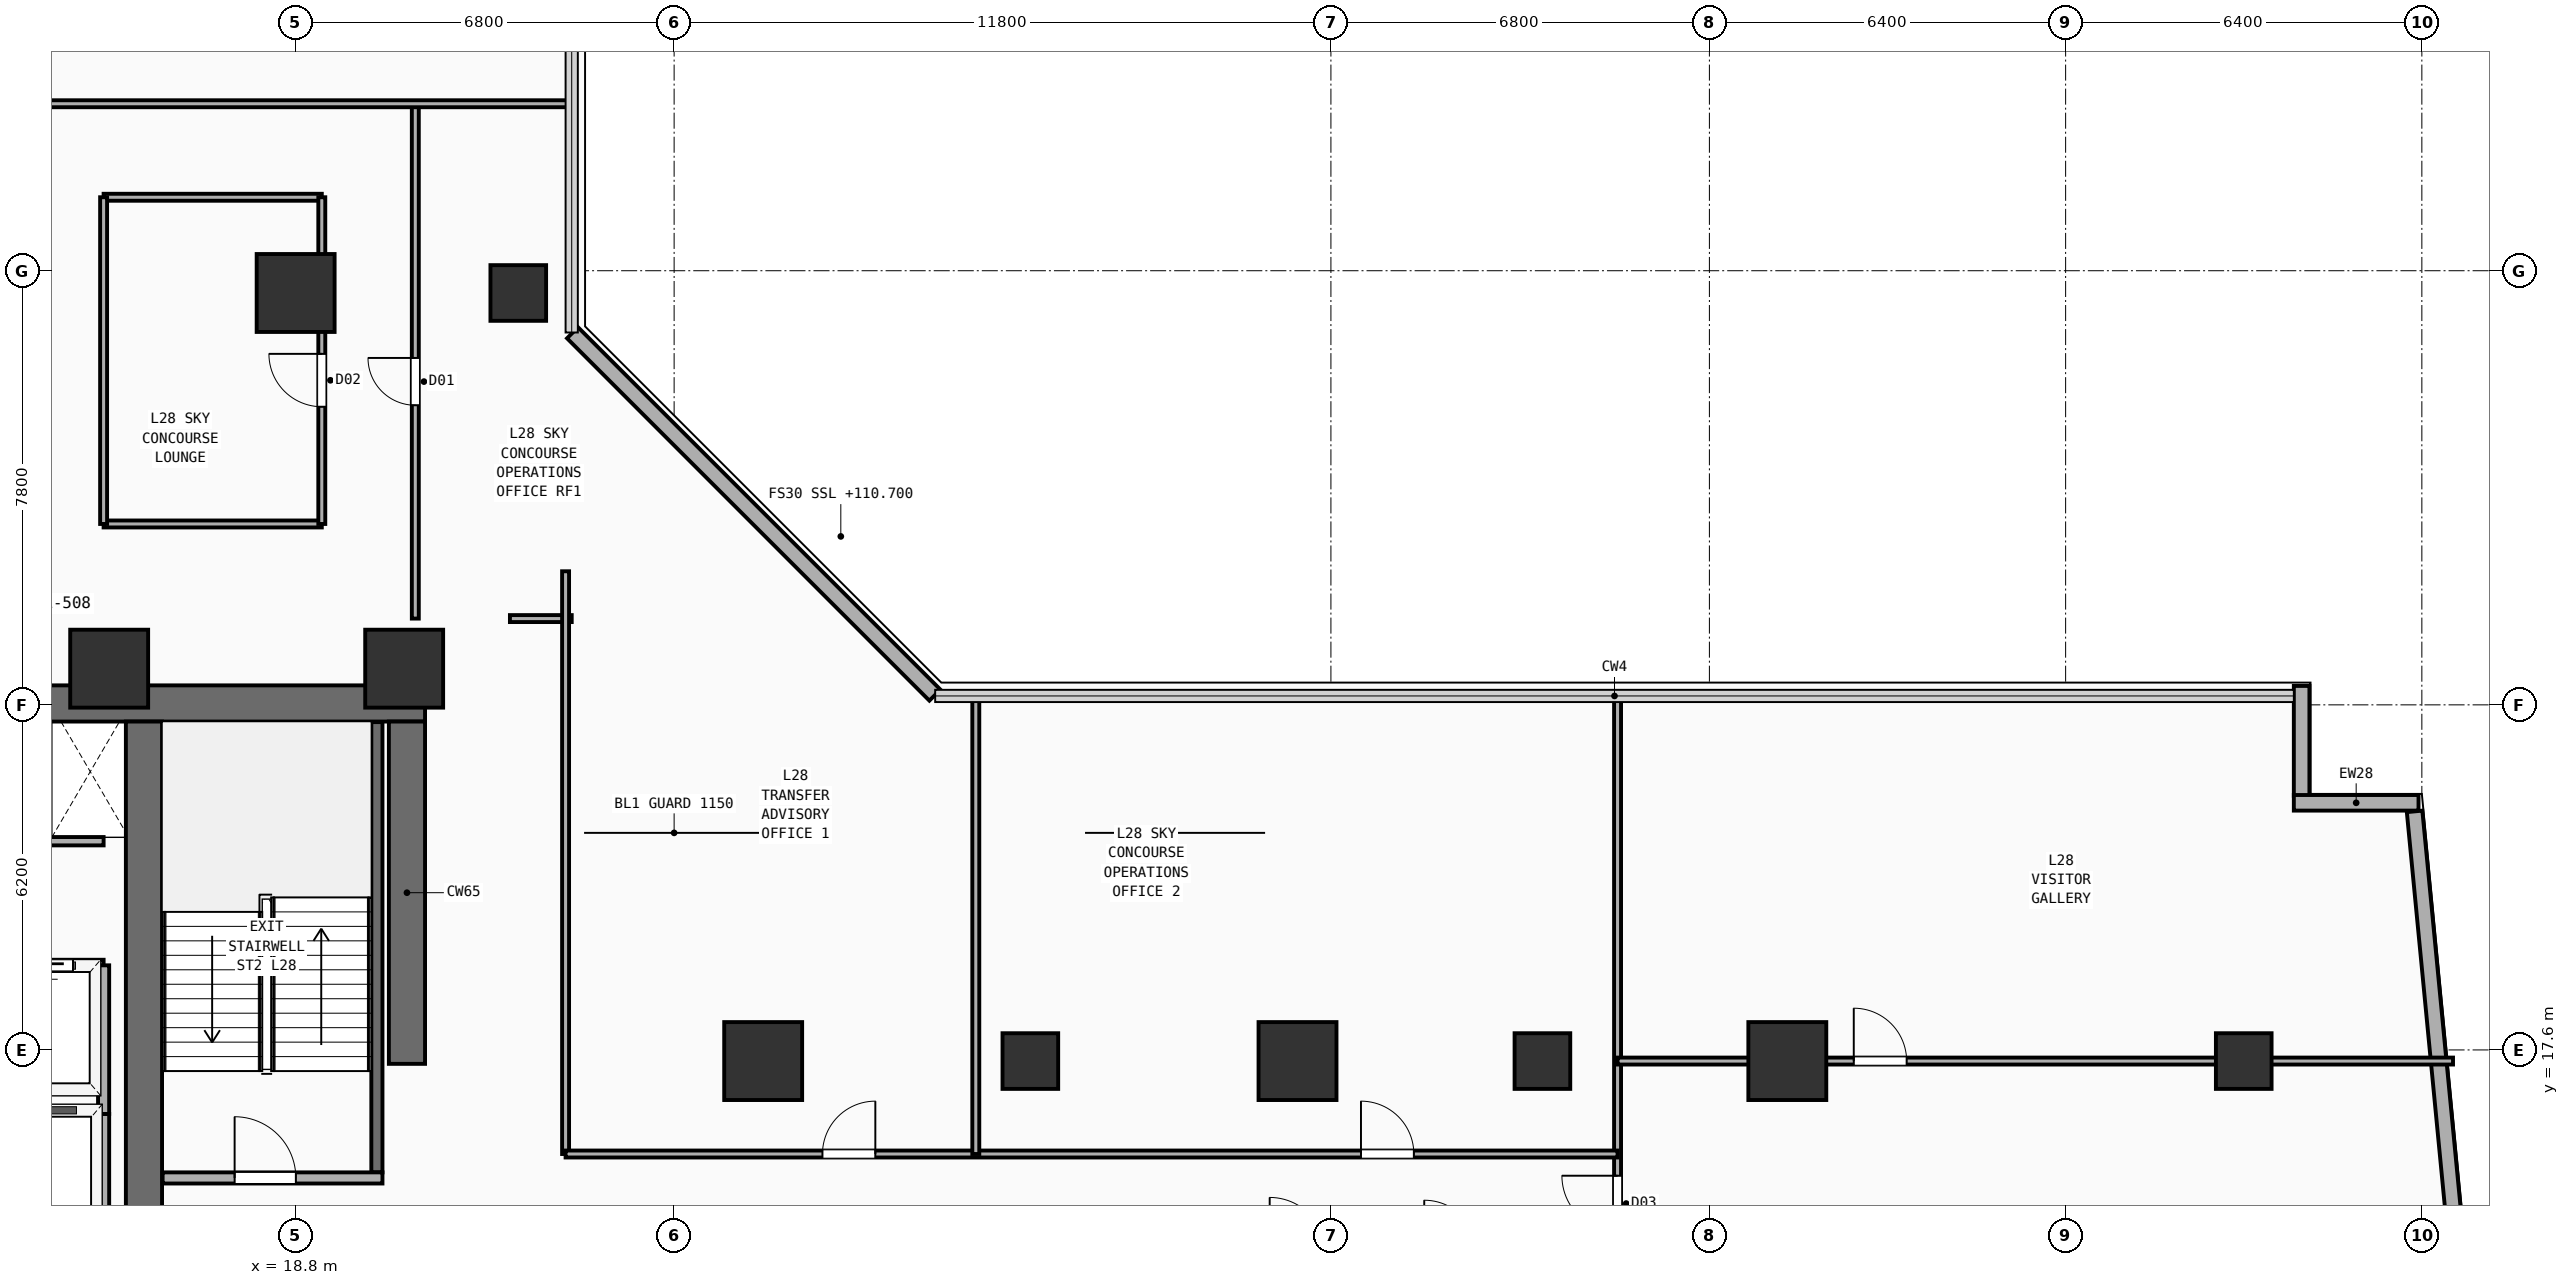
"""IFC4 building model, lengths in metres.
Left out: names, types, materials, properties, quantities, classifications, styles, units other than length and angle.
Written with IfcOpenShell. Run it as: python <this file> out.ifc"""

import sys

from ifc_helpers import new_model, si_unit, direction, frame, frame_2d, origin, origin_2d, place, context, subcontext, project, spatial, rectangle, extrude, element, fill, save


model = new_model("IFC4")
c1 = context("Model", 3, precision=1e-05, world=origin(), true_north=direction((0.0, 1.0)))
c2 = subcontext(c1, "Body", "Model", "MODEL_VIEW")
j1 = project(units=[si_unit("LENGTHUNIT", "METRE"), si_unit("PLANEANGLEUNIT", "RADIAN")], contexts=[c1])
p1 = place(None, origin())
s1 = spatial("IfcSite", under=j1, at=p1, CompositionType="ELEMENT")
p2 = place(p1, origin())
s2 = spatial("IfcBuilding", under=s1, at=p2, CompositionType="ELEMENT")
p3 = place(p2, frame((0.0, 0.0, 110.7)))
s3 = spatial("IfcBuildingStorey", under=s2, at=p3, CompositionType="ELEMENT", Elevation=110.7)
p4 = place(p3, frame((7.125, 23.825, 0.0), z_axis=(0.0, 0.0, 1.0), x_axis=(1.0, 0.0, 0.0)))
e1 = element("IfcWall", 1, at=p4, inside=s3, PredefinedType="SHEAR", context=c2, shape_type="SweptSolid", body=[
    extrude(rectangle(XDim=14.0, YDim=0.65, at=frame_2d((7.0, 0.0))), origin(), (0.0, 0.0, 1.0), 3.54),
])
p5 = place(p3, frame((20.8, 17.35, 0.0), z_axis=(0.0, 0.0, 1.0), x_axis=(0.0, 1.0, 0.0)))
e2 = element("IfcWall", 2, at=p5, inside=s3, PredefinedType="SHEAR", context=c2, shape_type="SweptSolid", body=[
    extrude(rectangle(XDim=6.15, YDim=0.65, at=frame_2d((3.075, 0.0))), origin(), (0.0, 0.0, 1.0), 3.54),
])
p6 = place(p3, frame((16.075, 14.4, 0.0), z_axis=(0.0, 0.0, 1.0), x_axis=(0.0, 1.0, 0.0)))
e3 = element("IfcWall", 3, at=p6, inside=s3, PredefinedType="SHEAR", context=c2, shape_type="SweptSolid", body=[
    extrude(rectangle(XDim=9.1, YDim=0.65, at=frame_2d((4.55, 0.0))), origin(), (0.0, 0.0, 1.0), 3.54),
])
for number, where, z_axis, x_axis in (
    (4, (15.45, 24.45, 0.0), (0.0, 0.0, 1.0), (1.0, 0.0, 0.0)),
    (5, (20.75, 24.45, 0.0), (0.0, 0.0, 1.0), (1.0, 0.0, 0.0)),
    (6, (18.8, 31.2, 0.0), (0.0, 0.0, 1.0), (1.0, 0.0, 0.0)),
    (7, (27.2, 17.4, 0.0), (0.0, 0.0, 1.0), (1.0, 0.0, 0.0)),
    (8, (36.8, 17.4, 0.0), (0.0, 0.0, 1.0), (1.0, 0.0, 0.0)),
    (9, (45.6, 17.4, 0.0), (0.0, 0.0, 1.0), (1.0, 0.0, 0.0)),
):
    element("IfcColumn", number, at=place(p3, frame(where, z_axis=z_axis, x_axis=x_axis)), inside=s3, PredefinedType="COLUMN", context=c2, shape_type="SweptSolid", body=[
        extrude(rectangle(XDim=1.4, YDim=1.4, at=origin_2d()), origin(), (0.0, 0.0, 1.0), 3.54),
    ])
for number, where, z_axis, x_axis in (
    (10, (53.8, 17.4, 0.0), (0.0, 0.0, 1.0), (1.0, 0.0, 0.0)),
    (11, (22.8, 31.2, 0.0), (0.0, 0.0, 1.0), (1.0, 0.0, 0.0)),
    (12, (32.0, 17.4, 0.0), (0.0, 0.0, 1.0), (1.0, 0.0, 0.0)),
    (13, (41.2, 17.4, 0.0), (0.0, 0.0, 1.0), (1.0, 0.0, 0.0)),
):
    element("IfcColumn", number, at=place(p3, frame(where, z_axis=z_axis, x_axis=x_axis)), inside=s3, PredefinedType="COLUMN", context=c2, shape_type="SweptSolid", body=[
        extrude(rectangle(XDim=1.0, YDim=1.0, at=origin_2d()), origin(), (0.0, 0.0, 1.0), 3.54),
    ])
p7 = place(p3, frame((54.84, 22.165, 0.0), z_axis=(0.0, 0.0, 1.0), x_axis=(0.0, 1.0, 0.0)))
e14 = element("IfcWall", 14, at=p7, inside=s3, PredefinedType="SOLIDWALL", context=c2, shape_type="SweptSolid", body=[
    extrude(rectangle(XDim=1.975, YDim=0.28, at=frame_2d((0.987, 0.0))), origin(), (0.0, 0.0, 1.0), 3.54),
])
p8 = place(p3, frame((54.7, 22.04, 0.0), z_axis=(0.0, 0.0, 1.0), x_axis=(1.0, 0.0, 0.0)))
e15 = element("IfcWall", 15, at=p8, inside=s3, PredefinedType="SOLIDWALL", context=c2, shape_type="SweptSolid", body=[
    extrude(rectangle(XDim=2.24, YDim=0.28, at=frame_2d((1.12, 0.0))), origin(), (0.0, 0.0, 1.0), 3.54),
])
p9 = place(p3, frame((30.285, 23.975, 0.0), z_axis=(0.0, 0.0, 1.0), x_axis=(-0.707106781187, 0.707106781187, 0.0)))
e16 = element("IfcWall", 16, at=p9, inside=s3, PredefinedType="SOLIDWALL", context=c2, shape_type="SweptSolid", body=[
    extrude(rectangle(XDim=9.207, YDim=0.28, at=frame_2d((4.603, 0.0))), origin(), (0.0, 0.0, 1.0), 3.54),
])
p10 = place(p3, frame((57.639, 13.905, 0.0), z_axis=(0.0, 0.0, 1.0), x_axis=(-0.095969995245, 0.995384227328, 0.0)))
e17 = element("IfcWall", 17, at=p10, inside=s3, PredefinedType="SOLIDWALL", context=c2, shape_type="SweptSolid", body=[
    extrude(rectangle(XDim=8.019, YDim=0.28, at=frame_2d((4.009, 0.0))), origin(), (0.0, 0.0, 1.0), 3.54),
])
p11 = place(p3, frame((20.26, 15.4, 0.0), z_axis=(0.0, 0.0, 1.0), x_axis=(0.0, 1.0, 0.0)))
e18 = element("IfcWall", 18, at=p11, inside=s3, PredefinedType="SHEAR", context=c2, shape_type="SweptSolid", body=[
    extrude(rectangle(XDim=8.09, YDim=0.2, at=frame_2d((4.045, 0.0))), origin(), (0.0, 0.0, 1.0), 3.54),
])
p12 = place(p3, frame((16.41, 15.3, 0.0), z_axis=(0.0, 0.0, 1.0), x_axis=(1.0, 0.0, 0.0)))
e19 = element("IfcWall", 19, at=p12, inside=s3, PredefinedType="PARTITIONING", context=c2, shape_type="SweptSolid", body=[
    extrude(rectangle(XDim=3.95, YDim=0.2, at=frame_2d((1.975, 0.0))), origin(), (0.0, 0.0, 1.0), 3.54),
])
p13 = place(p12, frame((1.294, 0.0, 0.0)))
e20 = element("IfcOpeningElement", 20, at=p13, cuts=e19, PredefinedType="OPENING", context=c2, shape_type="SweptSolid", body=[
    extrude(rectangle(XDim=1.1, YDim=2.2, at=frame_2d((0.55, 1.1))), frame((0.0, 0.11, 0.0), z_axis=(0.0, -1.0, 0.0), x_axis=(1.0, 0.0, 0.0)), (0.0, 0.0, 1.0), 0.22),
])
p14 = place(p3, frame((7.5, 16.45, 0.0), z_axis=(0.0, 0.0, 1.0), x_axis=(1.0, 0.0, 0.0)))
e21 = element("IfcWall", 21, at=p14, inside=s3, PredefinedType="PARTITIONING", context=c2, shape_type="SweptSolid", body=[
    extrude(rectangle(XDim=7.85, YDim=0.2, at=frame_2d((3.925, 0.0))), origin(), (0.0, 0.0, 1.0), 3.54),
])
p15 = place(p3, frame((15.35, 14.22, 0.0), z_axis=(0.0, 0.0, 1.0), x_axis=(0.0, 1.0, 0.0)))
e22 = element("IfcWall", 22, at=p15, inside=s3, PredefinedType="PARTITIONING", context=c2, shape_type="SweptSolid", body=[
    extrude(rectangle(XDim=2.23, YDim=0.2, at=frame_2d((1.115, 0.0))), origin(), (0.0, 0.0, 1.0), 3.54),
])
p16 = place(p3, frame((7.5, 19.12, 0.0), z_axis=(0.0, 0.0, 1.0), x_axis=(1.0, 0.0, 0.0)))
e23 = element("IfcWall", 23, at=p16, inside=s3, PredefinedType="PARTITIONING", context=c2, shape_type="SweptSolid", body=[
    extrude(rectangle(XDim=7.85, YDim=0.2, at=frame_2d((3.925, 0.0))), origin(), (0.0, 0.0, 1.0), 3.54),
])
p17 = place(p16, frame((0.53, 0.0, 0.0)))
e24 = element("IfcOpeningElement", 24, at=p17, cuts=e23, PredefinedType="OPENING", context=c2, shape_type="SweptSolid", body=[
    extrude(rectangle(XDim=1.1, YDim=2.2, at=frame_2d((0.55, 1.1))), frame((0.0, 0.11, 0.0), z_axis=(0.0, -1.0, 0.0), x_axis=(1.0, 0.0, 0.0)), (0.0, 0.0, 1.0), 0.22),
])
p18 = place(p16, frame((2.42, 0.0, 0.0)))
e25 = element("IfcOpeningElement", 25, at=p18, cuts=e23, PredefinedType="OPENING", context=c2, shape_type="SweptSolid", body=[
    extrude(rectangle(XDim=1.1, YDim=2.2, at=frame_2d((0.55, 1.1))), frame((0.0, 0.11, 0.0), z_axis=(0.0, -1.0, 0.0), x_axis=(1.0, 0.0, 0.0)), (0.0, 0.0, 1.0), 0.22),
])
p19 = place(p16, frame((4.31, 0.0, 0.0)))
e26 = element("IfcOpeningElement", 26, at=p19, cuts=e23, PredefinedType="OPENING", context=c2, shape_type="SweptSolid", body=[
    extrude(rectangle(XDim=1.1, YDim=2.2, at=frame_2d((0.55, 1.1))), frame((0.0, 0.11, 0.0), z_axis=(0.0, -1.0, 0.0), x_axis=(1.0, 0.0, 0.0)), (0.0, 0.0, 1.0), 0.22),
])
p20 = place(p16, frame((6.2, 0.0, 0.0)))
e27 = element("IfcOpeningElement", 27, at=p20, cuts=e23, PredefinedType="OPENING", context=c2, shape_type="SweptSolid", body=[
    extrude(rectangle(XDim=1.1, YDim=2.2, at=frame_2d((0.55, 1.1))), frame((0.0, 0.11, 0.0), z_axis=(0.0, -1.0, 0.0), x_axis=(1.0, 0.0, 0.0)), (0.0, 0.0, 1.0), 0.22),
])
p21 = place(p3, frame((15.35, 16.45, 0.0), z_axis=(0.0, 0.0, 1.0), x_axis=(0.0, 1.0, 0.0)))
e28 = element("IfcWall", 28, at=p21, inside=s3, PredefinedType="PARTITIONING", context=c2, shape_type="SweptSolid", body=[
    extrude(rectangle(XDim=2.67, YDim=0.2, at=frame_2d((1.335, 0.0))), origin(), (0.0, 0.0, 1.0), 3.54),
])
p22 = place(p3, frame((13.9, 21.35, 0.0), z_axis=(0.0, 0.0, 1.0), x_axis=(1.0, 0.0, 0.0)))
e29 = element("IfcWall", 29, at=p22, inside=s3, PredefinedType="PARTITIONING", context=c2, shape_type="SweptSolid", body=[
    extrude(rectangle(XDim=1.45, YDim=0.15, at=frame_2d((0.725, 0.0))), origin(), (0.0, 0.0, 1.0), 3.54),
])
for number, where, z_axis, x_axis in (
    (30, (15.35, 27.05, 0.0), (0.0, 0.0, 1.0), (1.0, 0.0, 0.0)),
    (31, (15.35, 32.92, 0.0), (0.0, 0.0, 1.0), (1.0, 0.0, 0.0)),
):
    element("IfcWall", number, at=place(p3, frame(where, z_axis=z_axis, x_axis=x_axis)), inside=s3, PredefinedType="PARTITIONING", context=c2, shape_type="SweptSolid", body=[
        extrude(rectangle(XDim=3.92, YDim=0.125, at=frame_2d((1.96, 0.0))), origin(), (0.0, 0.0, 1.0), 3.54),
    ])
p23 = place(p3, frame((15.35, 27.05, 0.0), z_axis=(0.0, 0.0, 1.0), x_axis=(0.0, 1.0, 0.0)))
e32 = element("IfcWall", 32, at=p23, inside=s3, PredefinedType="PARTITIONING", context=c2, shape_type="SweptSolid", body=[
    extrude(rectangle(XDim=5.87, YDim=0.125, at=frame_2d((2.935, 0.0))), origin(), (0.0, 0.0, 1.0), 3.54),
])
p24 = place(p3, frame((19.27, 27.05, 0.0), z_axis=(0.0, 0.0, 1.0), x_axis=(0.0, 1.0, 0.0)))
e33 = element("IfcWall", 33, at=p24, inside=s3, PredefinedType="PARTITIONING", context=c2, shape_type="SweptSolid", body=[
    extrude(rectangle(XDim=5.87, YDim=0.125, at=frame_2d((2.935, 0.0))), origin(), (0.0, 0.0, 1.0), 3.54),
])
p25 = place(p24, frame((2.106, 0.0, 0.0)))
e34 = element("IfcOpeningElement", 34, at=p25, cuts=e33, PredefinedType="OPENING", context=c2, shape_type="SweptSolid", body=[
    extrude(rectangle(XDim=0.95, YDim=2.15, at=frame_2d((0.475, 1.075))), frame((0.0, 0.073, 0.0), z_axis=(0.0, -1.0, 0.0), x_axis=(1.0, 0.0, 0.0)), (0.0, 0.0, 1.0), 0.145),
])
p26 = place(p3, frame((20.95, 25.35, 0.0), z_axis=(0.0, 0.0, 1.0), x_axis=(0.0, 1.0, 0.0)))
e35 = element("IfcWall", 35, at=p26, inside=s3, PredefinedType="PARTITIONING", context=c2, shape_type="SweptSolid", body=[
    extrude(rectangle(XDim=9.25, YDim=0.125, at=frame_2d((4.625, 0.0))), origin(), (0.0, 0.0, 1.0), 3.54),
])
p27 = place(p26, frame((3.833, 0.0, 0.0)))
e36 = element("IfcOpeningElement", 36, at=p27, cuts=e35, PredefinedType="OPENING", context=c2, shape_type="SweptSolid", body=[
    extrude(rectangle(XDim=0.85, YDim=2.15, at=frame_2d((0.425, 1.075))), frame((0.0, 0.073, 0.0), z_axis=(0.0, -1.0, 0.0), x_axis=(1.0, 0.0, 0.0)), (0.0, 0.0, 1.0), 0.145),
])
p28 = place(p3, frame((22.65, 25.35, 0.0), z_axis=(0.0, 0.0, 1.0), x_axis=(1.0, 0.0, 0.0)))
e37 = element("IfcWall", 37, at=p28, inside=s3, PredefinedType="PARTITIONING", context=c2, shape_type="SweptSolid", body=[
    extrude(rectangle(XDim=1.11, YDim=0.125, at=frame_2d((0.555, 0.0))), origin(), (0.0, 0.0, 1.0), 3.54),
])
p29 = place(p3, frame((11.98, 34.6, 0.0), z_axis=(0.0, 0.0, 1.0), x_axis=(1.0, 0.0, 0.0)))
e38 = element("IfcWall", 38, at=p29, inside=s3, PredefinedType="PARTITIONING", context=c2, shape_type="SweptSolid", body=[
    extrude(rectangle(XDim=11.78, YDim=0.125, at=frame_2d((5.89, 0.0))), origin(), (0.0, 0.0, 1.0), 3.54),
])
p30 = place(p3, frame((42.55, 3.84, 0.0), z_axis=(0.0, 0.0, 1.0), x_axis=(0.0, 1.0, 0.0)))
e39 = element("IfcWall", 39, at=p30, inside=s3, PredefinedType="PARTITIONING", context=c2, shape_type="SweptSolid", body=[
    extrude(rectangle(XDim=20.12, YDim=0.125, at=frame_2d((10.06, 0.0))), origin(), (0.0, 0.0, 1.0), 3.54),
])
p31 = place(p30, frame((10.5, 0.0, 0.0)))
e40 = element("IfcOpeningElement", 40, at=p31, cuts=e39, PredefinedType="OPENING", context=c2, shape_type="SweptSolid", body=[
    extrude(rectangle(XDim=1.0, YDim=2.2, at=frame_2d((0.5, 1.1))), frame((0.0, 0.073, 0.0), z_axis=(0.0, -1.0, 0.0), x_axis=(1.0, 0.0, 0.0)), (0.0, 0.0, 1.0), 0.145),
])
p32 = place(p3, frame((42.55, 17.4, 0.0), z_axis=(0.0, 0.0, 1.0), x_axis=(1.0, 0.0, 0.0)))
e41 = element("IfcWall", 41, at=p32, inside=s3, PredefinedType="PARTITIONING", context=c2, shape_type="SweptSolid", body=[
    extrude(rectangle(XDim=15.01, YDim=0.125, at=frame_2d((7.505, 0.0))), origin(), (0.0, 0.0, 1.0), 3.24),
])
p33 = place(p32, frame((4.244, 0.0, 0.0)))
e42 = element("IfcOpeningElement", 42, at=p33, cuts=e41, PredefinedType="OPENING", context=c2, shape_type="SweptSolid", body=[
    extrude(rectangle(XDim=0.95, YDim=2.15, at=frame_2d((0.475, 1.075))), frame((0.0, 0.073, 0.0), z_axis=(0.0, -1.0, 0.0), x_axis=(1.0, 0.0, 0.0)), (0.0, 0.0, 1.0), 0.145),
])
p34 = place(p3, frame((23.65, 15.73, 0.0), z_axis=(0.0, 0.0, 1.0), x_axis=(0.0, 1.0, 0.0)))
e43 = element("IfcWall", 43, at=p34, inside=s3, PredefinedType="PARTITIONING", context=c2, shape_type="SweptSolid", body=[
    extrude(rectangle(XDim=10.47, YDim=0.125, at=frame_2d((5.235, 0.0))), origin(), (0.0, 0.0, 1.0), 3.54),
])
p35 = place(p3, frame((23.65, 15.73, 0.0), z_axis=(0.0, 0.0, 1.0), x_axis=(1.0, 0.0, 0.0)))
e44 = element("IfcWall", 44, at=p35, inside=s3, PredefinedType="PARTITIONING", context=c2, shape_type="SweptSolid", body=[
    extrude(rectangle(XDim=18.9, YDim=0.125, at=frame_2d((9.45, 0.0))), origin(), (0.0, 0.0, 1.0), 3.09),
])
p36 = place(p35, frame((4.615, 0.0, 0.0)))
e45 = element("IfcOpeningElement", 45, at=p36, cuts=e44, PredefinedType="OPENING", context=c2, shape_type="SweptSolid", body=[
    extrude(rectangle(XDim=0.95, YDim=2.15, at=frame_2d((0.475, 1.075))), frame((0.0, 0.073, 0.0), z_axis=(0.0, -1.0, 0.0), x_axis=(1.0, 0.0, 0.0)), (0.0, 0.0, 1.0), 0.145),
])
p37 = place(p35, frame((14.29, 0.0, 0.0)))
e46 = element("IfcOpeningElement", 46, at=p37, cuts=e44, PredefinedType="OPENING", context=c2, shape_type="SweptSolid", body=[
    extrude(rectangle(XDim=0.95, YDim=2.15, at=frame_2d((0.475, 1.075))), frame((0.0, 0.073, 0.0), z_axis=(0.0, -1.0, 0.0), x_axis=(1.0, 0.0, 0.0)), (0.0, 0.0, 1.0), 0.145),
])
p38 = place(p3, frame((31.02, 15.73, 0.0), z_axis=(0.0, 0.0, 1.0), x_axis=(0.0, 1.0, 0.0)))
e47 = element("IfcWall", 47, at=p38, inside=s3, PredefinedType="PARTITIONING", context=c2, shape_type="SweptSolid", body=[
    extrude(rectangle(XDim=8.23, YDim=0.125, at=frame_2d((4.115, 0.0))), origin(), (0.0, 0.0, 1.0), 3.54),
])
p39 = place(p13, origin())
e48 = element("IfcDoor", 48, at=p39, inside=s3, OperationType="SINGLE_SWING_LEFT", PredefinedType="DOOR", context=c2, shape_type="SweptSolid", body=[
    extrude(rectangle(XDim=1.1, YDim=2.2, at=frame_2d((0.55, 1.1))), frame((0.0, 0.025, 0.0), z_axis=(0.0, -1.0, 0.0), x_axis=(1.0, 0.0, 0.0)), (0.0, 0.0, 1.0), 0.05),
])
fill(e20, e48)
p40 = place(p20, origin())
e49 = element("IfcDoor", 49, at=p40, inside=s3, OperationType="SLIDING_TO_LEFT", PredefinedType="DOOR", context=c2, shape_type="SweptSolid", body=[
    extrude(rectangle(XDim=1.1, YDim=2.2, at=frame_2d((0.55, 1.1))), frame((0.0, 0.025, 0.0), z_axis=(0.0, -1.0, 0.0), x_axis=(1.0, 0.0, 0.0)), (0.0, 0.0, 1.0), 0.05),
])
fill(e27, e49)
p41 = place(p25, origin())
e50 = element("IfcDoor", 50, at=p41, inside=s3, OperationType="SINGLE_SWING_RIGHT", PredefinedType="DOOR", context=c2, shape_type="SweptSolid", body=[
    extrude(rectangle(XDim=0.95, YDim=2.15, at=frame_2d((0.475, 1.075))), frame((0.0, 0.025, 0.0), z_axis=(0.0, -1.0, 0.0), x_axis=(1.0, 0.0, 0.0)), (0.0, 0.0, 1.0), 0.05),
])
fill(e34, e50)
p42 = place(p27, origin())
e51 = element("IfcDoor", 51, at=p42, inside=s3, OperationType="SINGLE_SWING_RIGHT", PredefinedType="DOOR", context=c2, shape_type="SweptSolid", body=[
    extrude(rectangle(XDim=0.85, YDim=2.15, at=frame_2d((0.425, 1.075))), frame((0.0, 0.025, 0.0), z_axis=(0.0, -1.0, 0.0), x_axis=(1.0, 0.0, 0.0)), (0.0, 0.0, 1.0), 0.05),
])
fill(e36, e51)
p43 = place(p31, origin())
e52 = element("IfcDoor", 52, at=p43, inside=s3, OperationType="SINGLE_SWING_RIGHT", PredefinedType="DOOR", context=c2, shape_type="SweptSolid", body=[
    extrude(rectangle(XDim=1.0, YDim=2.2, at=frame_2d((0.5, 1.1))), frame((0.0, 0.025, 0.0), z_axis=(0.0, -1.0, 0.0), x_axis=(1.0, 0.0, 0.0)), (0.0, 0.0, 1.0), 0.05),
])
fill(e40, e52)
p44 = place(p33, origin())
e53 = element("IfcDoor", 53, at=p44, inside=s3, OperationType="SINGLE_SWING_LEFT", PredefinedType="DOOR", context=c2, shape_type="SweptSolid", body=[
    extrude(rectangle(XDim=0.95, YDim=2.15, at=frame_2d((0.475, 1.075))), frame((0.0, 0.025, 0.0), z_axis=(0.0, -1.0, 0.0), x_axis=(1.0, 0.0, 0.0)), (0.0, 0.0, 1.0), 0.05),
])
fill(e42, e53)
p45 = place(p36, origin())
e54 = element("IfcDoor", 54, at=p45, inside=s3, OperationType="SINGLE_SWING_RIGHT", PredefinedType="DOOR", context=c2, shape_type="SweptSolid", body=[
    extrude(rectangle(XDim=0.95, YDim=2.15, at=frame_2d((0.475, 1.075))), frame((0.0, 0.025, 0.0), z_axis=(0.0, -1.0, 0.0), x_axis=(1.0, 0.0, 0.0)), (0.0, 0.0, 1.0), 0.05),
])
fill(e45, e54)
p46 = place(p37, origin())
e55 = element("IfcDoor", 55, at=p46, inside=s3, OperationType="SINGLE_SWING_LEFT", PredefinedType="DOOR", context=c2, shape_type="SweptSolid", body=[
    extrude(rectangle(XDim=0.95, YDim=2.15, at=frame_2d((0.475, 1.075))), frame((0.0, 0.025, 0.0), z_axis=(0.0, -1.0, 0.0), x_axis=(1.0, 0.0, 0.0)), (0.0, 0.0, 1.0), 0.05),
])
fill(e46, e55)
save(model, sys.argv[1])
